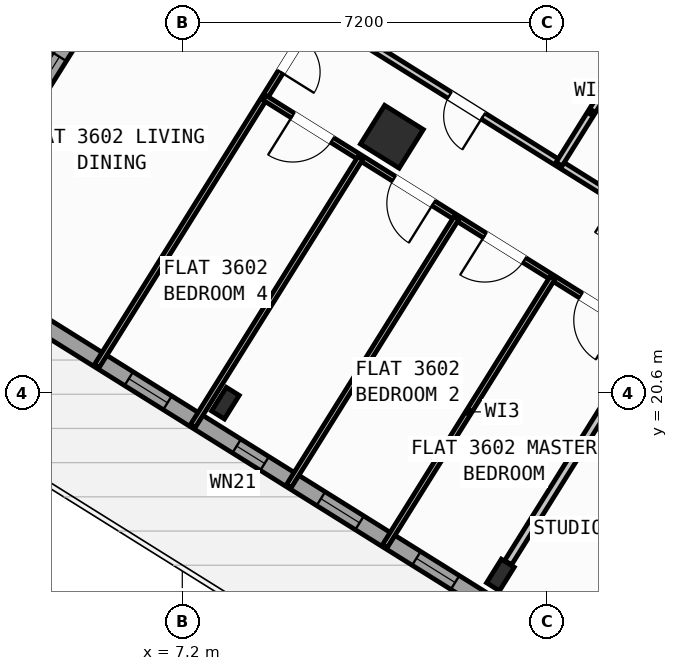
"""IFC4 building model, lengths in metres.
Left out: names, types, materials, properties, quantities, classifications, styles, units other than length and angle.
Written with IfcOpenShell. Run it as: python <this file> out.ifc"""

import sys

from ifc_helpers import new_model, si_unit, direction, frame, frame_2d, origin, origin_2d, place, context, subcontext, project, spatial, rectangle, hollow_rectangle, i_section, extrude, source, transform, mapped, element, fill, save


model = new_model("IFC4")
c1 = context("Model", 3, precision=1e-05, world=origin(), true_north=direction((0.0, 1.0)))
c2 = subcontext(c1, "Body", "Model", "MODEL_VIEW")
j1 = project(units=[si_unit("LENGTHUNIT", "METRE"), si_unit("PLANEANGLEUNIT", "RADIAN")], contexts=[c1])
p1 = place(None, origin())
s1 = spatial("IfcSite", under=j1, at=p1, CompositionType="ELEMENT")
p2 = place(p1, origin())
s2 = spatial("IfcBuilding", under=s1, at=p2, CompositionType="ELEMENT")
p3 = place(p2, frame((0.0, 0.0, 144.3)))
s3 = spatial("IfcBuildingStorey", under=s2, at=p3, CompositionType="ELEMENT", Elevation=144.3)
m1 = source(origin(), c2, "Body", "SweptSolid", [
    extrude(i_section(OverallWidth=0.3, OverallDepth=0.55, WebThickness=0.015, FlangeThickness=0.029, at=origin_2d()), origin(), (0.0, 0.0, 1.0), 3.6),
])
p4 = place(p3, frame((13.478, 17.003, 0.0), z_axis=(0.0, 0.0, 1.0), x_axis=(-0.848048096156, 0.529919264233, 0.0)))
e1 = element("IfcColumn", 1, at=p4, inside=s3, PredefinedType="COLUMN", context=c2, shape_type="MappedRepresentation", body=[
    mapped(m1, transform((0.0, 0.0, 0.0), scale=1.0)),
])
m2 = source(origin(), c2, "Body", "SweptSolid", [
    extrude(hollow_rectangle(XDim=0.9, YDim=0.9, WallThickness=0.036, at=origin_2d()), origin(), (0.0, 0.0, 1.0), 3.6),
])
p5 = place(p3, frame((11.336, 25.653, 0.0), z_axis=(0.0, 0.0, 1.0), x_axis=(-0.848048096156, 0.529919264233, 0.0)))
e2 = element("IfcColumn", 2, at=p5, inside=s3, PredefinedType="COLUMN", context=c2, shape_type="MappedRepresentation", body=[
    mapped(m2, transform((0.0, 0.0, 0.0), scale=1.0)),
])
p6 = place(p3, frame((8.051, 20.395, 0.0), z_axis=(0.0, 0.0, 1.0), x_axis=(-0.848048096156, 0.529919264233, 0.0)))
e3 = element("IfcColumn", 3, at=p6, inside=s3, PredefinedType="COLUMN", context=c2, shape_type="MappedRepresentation", body=[
    mapped(m1, transform((0.0, 0.0, 0.0), scale=1.0)),
])
p7 = place(p3, frame((29.268, 6.429, 0.0), z_axis=(0.0, 0.0, 1.0), x_axis=(-0.848049971435, 0.529916263149, 0.0)))
e4 = element("IfcWall", 4, at=p7, inside=s3, PredefinedType="STANDARD", context=c2, shape_type="SweptSolid", body=[
    extrude(rectangle(XDim=31.588, YDim=0.32, at=frame_2d((15.794, 0.0))), origin(), (0.0, 0.0, 1.0), 3.35),
])
p8 = place(p7, frame((16.362, 0.0, 0.0)))
e5 = element("IfcOpeningElement", 5, at=p8, cuts=e4, PredefinedType="OPENING", context=c2, shape_type="SweptSolid", body=[
    extrude(rectangle(XDim=1.2, YDim=2.15, at=frame_2d((0.6, 1.075))), frame((0.0, 0.17, 0.0), z_axis=(0.0, -1.0, 0.0), x_axis=(1.0, 0.0, 0.0)), (0.0, 0.0, 1.0), 0.34),
])
p9 = place(p7, frame((2.989, 0.0, 0.8)))
e6 = element("IfcOpeningElement", 6, at=p9, cuts=e4, PredefinedType="OPENING", context=c2, shape_type="SweptSolid", body=[
    extrude(rectangle(XDim=2.1, YDim=1.55, at=frame_2d((1.05, 0.775))), frame((0.0, 0.17, 0.0), z_axis=(0.0, -1.0, 0.0), x_axis=(1.0, 0.0, 0.0)), (0.0, 0.0, 1.0), 0.34),
])
p10 = place(p7, frame((8.359, 0.0, 0.8)))
e7 = element("IfcOpeningElement", 7, at=p10, cuts=e4, PredefinedType="OPENING", context=c2, shape_type="SweptSolid", body=[
    extrude(rectangle(XDim=2.1, YDim=1.55, at=frame_2d((1.05, 0.775))), frame((0.0, 0.17, 0.0), z_axis=(0.0, -1.0, 0.0), x_axis=(1.0, 0.0, 0.0)), (0.0, 0.0, 1.0), 0.34),
])
p11 = place(p7, frame((13.284, 0.0, 0.95)))
e8 = element("IfcOpeningElement", 8, at=p11, cuts=e4, PredefinedType="OPENING", context=c2, shape_type="SweptSolid", body=[
    extrude(rectangle(XDim=1.2, YDim=1.4, at=frame_2d((0.6, 0.7))), frame((0.0, 0.17, 0.0), z_axis=(0.0, -1.0, 0.0), x_axis=(1.0, 0.0, 0.0)), (0.0, 0.0, 1.0), 0.34),
])
p12 = place(p7, frame((29.188, 0.0, 0.95)))
e9 = element("IfcOpeningElement", 9, at=p12, cuts=e4, PredefinedType="OPENING", context=c2, shape_type="SweptSolid", body=[
    extrude(rectangle(XDim=1.2, YDim=1.4, at=frame_2d((0.6, 0.7))), frame((0.0, 0.17, 0.0), z_axis=(0.0, -1.0, 0.0), x_axis=(1.0, 0.0, 0.0)), (0.0, 0.0, 1.0), 0.34),
])
p13 = place(p7, frame((19.674, 0.0, 1.0)))
e10 = element("IfcOpeningElement", 10, at=p13, cuts=e4, PredefinedType="OPENING", context=c2, shape_type="SweptSolid", body=[
    extrude(rectangle(XDim=0.9, YDim=1.25, at=frame_2d((0.45, 0.625))), frame((0.0, 0.17, 0.0), z_axis=(0.0, -1.0, 0.0), x_axis=(1.0, 0.0, 0.0)), (0.0, 0.0, 1.0), 0.34),
])
p14 = place(p7, frame((21.896, 0.0, 1.0)))
e11 = element("IfcOpeningElement", 11, at=p14, cuts=e4, PredefinedType="OPENING", context=c2, shape_type="SweptSolid", body=[
    extrude(rectangle(XDim=0.9, YDim=1.25, at=frame_2d((0.45, 0.625))), frame((0.0, 0.17, 0.0), z_axis=(0.0, -1.0, 0.0), x_axis=(1.0, 0.0, 0.0)), (0.0, 0.0, 1.0), 0.34),
])
p15 = place(p7, frame((24.106, 0.0, 1.0)))
e12 = element("IfcOpeningElement", 12, at=p15, cuts=e4, PredefinedType="OPENING", context=c2, shape_type="SweptSolid", body=[
    extrude(rectangle(XDim=0.65, YDim=1.15, at=frame_2d((0.325, 0.575))), frame((0.0, 0.17, 0.0), z_axis=(0.0, -1.0, 0.0), x_axis=(1.0, 0.0, 0.0)), (0.0, 0.0, 1.0), 0.34),
])
p16 = place(p7, frame((26.366, 0.0, 1.0)))
e13 = element("IfcOpeningElement", 13, at=p16, cuts=e4, PredefinedType="OPENING", context=c2, shape_type="SweptSolid", body=[
    extrude(rectangle(XDim=0.9, YDim=1.25, at=frame_2d((0.45, 0.625))), frame((0.0, 0.17, 0.0), z_axis=(0.0, -1.0, 0.0), x_axis=(1.0, 0.0, 0.0)), (0.0, 0.0, 1.0), 0.34),
])
p17 = place(p3, frame((2.415, 23.452, 0.0), z_axis=(0.0, 0.0, 1.0), x_axis=(0.52991049553, 0.848053575387, 0.0)))
e14 = element("IfcWall", 14, at=p17, inside=s3, PredefinedType="STANDARD", context=c2, shape_type="SweptSolid", body=[
    extrude(rectangle(XDim=21.587, YDim=0.32, at=frame_2d((10.794, 0.0))), origin(), (0.0, 0.0, 1.0), 2.775),
])
p18 = place(p17, frame((2.356, 0.0, 0.8)))
e15 = element("IfcOpeningElement", 15, at=p18, cuts=e14, PredefinedType="OPENING", context=c2, shape_type="SweptSolid", body=[
    extrude(rectangle(XDim=2.1, YDim=1.55, at=frame_2d((1.05, 0.775))), frame((0.0, 0.17, 0.0), z_axis=(0.0, -1.0, 0.0), x_axis=(1.0, 0.0, 0.0)), (0.0, 0.0, 1.0), 0.34),
])
p19 = place(p17, frame((8.639, 0.0, 1.0)))
e16 = element("IfcOpeningElement", 16, at=p19, cuts=e14, PredefinedType="OPENING", context=c2, shape_type="SweptSolid", body=[
    extrude(rectangle(XDim=0.9, YDim=1.25, at=frame_2d((0.45, 0.625))), frame((0.0, 0.17, 0.0), z_axis=(0.0, -1.0, 0.0), x_axis=(1.0, 0.0, 0.0)), (0.0, 0.0, 1.0), 0.34),
])
p20 = place(p17, frame((17.744, 0.0, 0.85)))
e17 = element("IfcOpeningElement", 17, at=p20, cuts=e14, PredefinedType="OPENING", context=c2, shape_type="SweptSolid", body=[
    extrude(rectangle(XDim=1.5, YDim=1.5, at=frame_2d((0.75, 0.75))), frame((0.0, 0.17, 0.0), z_axis=(0.0, -1.0, 0.0), x_axis=(1.0, 0.0, 0.0)), (0.0, 0.0, 1.0), 0.34),
])
p21 = place(p3, frame((14.138, 41.825, 0.0), z_axis=(0.0, 0.0, 1.0), x_axis=(0.848046498049, -0.529921821731, 0.0)))
e18 = element("IfcWall", 18, at=p21, inside=s3, PredefinedType="STANDARD", context=c2, shape_type="SweptSolid", body=[
    extrude(rectangle(XDim=31.588, YDim=0.32, at=frame_2d((15.794, 0.0))), origin(), (0.0, 0.0, 1.0), 3.35),
])
p22 = place(p21, frame((2.949, 0.0, 0.0)))
e19 = element("IfcOpeningElement", 19, at=p22, cuts=e18, PredefinedType="OPENING", context=c2, shape_type="SweptSolid", body=[
    extrude(rectangle(XDim=1.05, YDim=2.15, at=frame_2d((0.525, 1.075))), frame((0.0, 0.17, 0.0), z_axis=(0.0, -1.0, 0.0), x_axis=(1.0, 0.0, 0.0)), (0.0, 0.0, 1.0), 0.34),
])
p23 = place(p21, frame((0.861, 0.0, 0.85)))
e20 = element("IfcOpeningElement", 20, at=p23, cuts=e18, PredefinedType="OPENING", context=c2, shape_type="SweptSolid", body=[
    extrude(rectangle(XDim=1.5, YDim=1.5, at=frame_2d((0.75, 0.75))), frame((0.0, 0.17, 0.0), z_axis=(0.0, -1.0, 0.0), x_axis=(1.0, 0.0, 0.0)), (0.0, 0.0, 1.0), 0.34),
])
p24 = place(p21, frame((8.494, 0.0, 0.85)))
e21 = element("IfcOpeningElement", 21, at=p24, cuts=e18, PredefinedType="OPENING", context=c2, shape_type="SweptSolid", body=[
    extrude(rectangle(XDim=1.8, YDim=1.5, at=frame_2d((0.9, 0.75))), frame((0.0, 0.17, 0.0), z_axis=(0.0, -1.0, 0.0), x_axis=(1.0, 0.0, 0.0)), (0.0, 0.0, 1.0), 0.34),
])
p25 = place(p21, frame((13.874, 0.0, 0.85)))
e22 = element("IfcOpeningElement", 22, at=p25, cuts=e18, PredefinedType="OPENING", context=c2, shape_type="SweptSolid", body=[
    extrude(rectangle(XDim=1.5, YDim=1.5, at=frame_2d((0.75, 0.75))), frame((0.0, 0.17, 0.0), z_axis=(0.0, -1.0, 0.0), x_axis=(1.0, 0.0, 0.0)), (0.0, 0.0, 1.0), 0.34),
])
p26 = place(p21, frame((17.104, 0.0, 1.0)))
e23 = element("IfcOpeningElement", 23, at=p26, cuts=e18, PredefinedType="OPENING", context=c2, shape_type="SweptSolid", body=[
    extrude(rectangle(XDim=0.9, YDim=1.25, at=frame_2d((0.45, 0.625))), frame((0.0, 0.17, 0.0), z_axis=(0.0, -1.0, 0.0), x_axis=(1.0, 0.0, 0.0)), (0.0, 0.0, 1.0), 0.34),
])
p27 = place(p21, frame((22.144, 0.0, 1.0)))
e24 = element("IfcOpeningElement", 24, at=p27, cuts=e18, PredefinedType="OPENING", context=c2, shape_type="SweptSolid", body=[
    extrude(rectangle(XDim=0.9, YDim=1.25, at=frame_2d((0.45, 0.625))), frame((0.0, 0.17, 0.0), z_axis=(0.0, -1.0, 0.0), x_axis=(1.0, 0.0, 0.0)), (0.0, 0.0, 1.0), 0.34),
])
p28 = place(p21, frame((27.744, 0.0, 1.0)))
e25 = element("IfcOpeningElement", 25, at=p28, cuts=e18, PredefinedType="OPENING", context=c2, shape_type="SweptSolid", body=[
    extrude(rectangle(XDim=0.9, YDim=1.25, at=frame_2d((0.45, 0.625))), frame((0.0, 0.17, 0.0), z_axis=(0.0, -1.0, 0.0), x_axis=(1.0, 0.0, 0.0)), (0.0, 0.0, 1.0), 0.34),
])
p29 = place(p3, frame((23.104, 25.256, 0.0), z_axis=(0.0, 0.0, 1.0), x_axis=(-0.848041752158, 0.529929416617, 0.0)))
e26 = element("IfcWall", 26, at=p29, inside=s3, PredefinedType="PARTITIONING", context=c2, shape_type="SweptSolid", body=[
    extrude(rectangle(XDim=16.73, YDim=0.16, at=frame_2d((8.365, 0.0))), origin(), (0.0, 0.0, 1.0), 3.34),
])
p30 = place(p29, frame((2.22, 0.0, 0.0)))
e27 = element("IfcOpeningElement", 27, at=p30, cuts=e26, PredefinedType="OPENING", context=c2, shape_type="SweptSolid", body=[
    extrude(rectangle(XDim=0.86, YDim=2.05, at=frame_2d((0.43, 1.025))), frame((0.0, 0.09, 0.0), z_axis=(0.0, -1.0, 0.0), x_axis=(1.0, 0.0, 0.0)), (0.0, 0.0, 1.0), 0.18),
])
p31 = place(p29, frame((12.084, 0.0, 0.0)))
e28 = element("IfcOpeningElement", 28, at=p31, cuts=e26, PredefinedType="OPENING", context=c2, shape_type="SweptSolid", body=[
    extrude(rectangle(XDim=1.0, YDim=2.1, at=frame_2d((0.5, 1.05))), frame((0.0, 0.09, 0.0), z_axis=(0.0, -1.0, 0.0), x_axis=(1.0, 0.0, 0.0)), (0.0, 0.0, 1.0), 0.18),
])
p32 = place(p3, frame((21.938, 23.391, 0.0), z_axis=(0.0, 0.0, 1.0), x_axis=(-0.848045850158, 0.529922858565, 0.0)))
e29 = element("IfcWall", 29, at=p32, inside=s3, PredefinedType="PARTITIONING", context=c2, shape_type="SweptSolid", body=[
    extrude(rectangle(XDim=16.73, YDim=0.16, at=frame_2d((8.365, 0.0))), origin(), (0.0, 0.0, 1.0), 3.34),
])
p33 = place(p32, frame((2.22, 0.0, 0.0)))
e30 = element("IfcOpeningElement", 30, at=p33, cuts=e29, PredefinedType="OPENING", context=c2, shape_type="SweptSolid", body=[
    extrude(rectangle(XDim=0.86, YDim=2.05, at=frame_2d((0.43, 1.025))), frame((0.0, 0.09, 0.0), z_axis=(0.0, -1.0, 0.0), x_axis=(1.0, 0.0, 0.0)), (0.0, 0.0, 1.0), 0.18),
])
p34 = place(p32, frame((14.22, 0.0, 0.0)))
e31 = element("IfcOpeningElement", 31, at=p34, cuts=e29, PredefinedType="OPENING", context=c2, shape_type="SweptSolid", body=[
    extrude(rectangle(XDim=1.0, YDim=2.1, at=frame_2d((0.5, 1.05))), frame((0.0, 0.09, 0.0), z_axis=(0.0, -1.0, 0.0), x_axis=(1.0, 0.0, 0.0)), (0.0, 0.0, 1.0), 0.18),
])
p35 = place(p3, frame((16.519, 21.87, 0.0), z_axis=(0.0, 0.0, 1.0), x_axis=(-0.529922447305, -0.848046107144, 0.0)))
e32 = element("IfcWall", 32, at=p35, inside=s3, PredefinedType="PARTITIONING", context=c2, shape_type="SweptSolid", body=[
    extrude(rectangle(XDim=5.451, YDim=0.16, at=frame_2d((2.726, 0.0))), origin(), (0.0, 0.0, 1.0), 2.775),
])
p36 = place(p3, frame((11.143, 30.136, 0.0), z_axis=(0.0, 0.0, 1.0), x_axis=(-0.529922479612, -0.848046086956, 0.0)))
e33 = element("IfcWall", 33, at=p36, inside=s3, PredefinedType="PARTITIONING", context=c2, shape_type="SweptSolid", body=[
    extrude(rectangle(XDim=10.62, YDim=0.11, at=frame_2d((5.31, 0.0))), origin(), (0.0, 0.0, 1.0), 3.34),
])
p37 = place(p36, frame((3.0, 0.0, 0.0)))
e34 = element("IfcOpeningElement", 34, at=p37, cuts=e33, PredefinedType="OPENING", context=c2, shape_type="SweptSolid", body=[
    extrude(rectangle(XDim=0.78, YDim=2.05, at=frame_2d((0.39, 1.025))), frame((0.0, 0.065, 0.0), z_axis=(0.0, -1.0, 0.0), x_axis=(1.0, 0.0, 0.0)), (0.0, 0.0, 1.0), 0.13),
])
p38 = place(p3, frame((17.452, 23.364, 0.0), z_axis=(0.0, 0.0, 1.0), x_axis=(-0.848044326704, 0.52992529657, 0.0)))
e35 = element("IfcWall", 35, at=p38, inside=s3, PredefinedType="PLUMBINGWALL", context=c2, shape_type="SweptSolid", body=[
    extrude(rectangle(XDim=8.94, YDim=0.14, at=frame_2d((4.47, 0.0))), origin(), (0.0, 0.0, 1.0), 3.34),
])
p39 = place(p38, frame((5.087, 0.0, 0.0)))
e36 = element("IfcOpeningElement", 36, at=p39, cuts=e35, PredefinedType="OPENING", context=c2, shape_type="SweptSolid", body=[
    extrude(rectangle(XDim=0.78, YDim=2.05, at=frame_2d((0.39, 1.025))), frame((0.0, 0.08, 0.0), z_axis=(0.0, -1.0, 0.0), x_axis=(1.0, 0.0, 0.0)), (0.0, 0.0, 1.0), 0.16),
])
p40 = place(p38, frame((1.218, 0.0, 0.0)))
e37 = element("IfcOpeningElement", 37, at=p40, cuts=e35, PredefinedType="OPENING", context=c2, shape_type="SweptSolid", body=[
    extrude(rectangle(XDim=0.78, YDim=2.05, at=frame_2d((0.39, 1.025))), frame((0.0, 0.08, 0.0), z_axis=(0.0, -1.0, 0.0), x_axis=(1.0, 0.0, 0.0)), (0.0, 0.0, 1.0), 0.16),
])
p41 = place(p3, frame((15.913, 27.156, 0.0), z_axis=(0.0, 0.0, 1.0), x_axis=(-0.529935194983, -0.848038141311, 0.0)))
e38 = element("IfcWall", 38, at=p41, inside=s3, PredefinedType="PLUMBINGWALL", context=c2, shape_type="SweptSolid", body=[
    extrude(rectangle(XDim=2.41, YDim=0.14, at=frame_2d((1.205, 0.0))), origin(), (0.0, 0.0, 1.0), 3.34),
])
p42 = place(p3, frame((16.403, 21.685, 0.0), z_axis=(0.0, 0.0, 1.0), x_axis=(-0.848044326704, 0.52992529657, 0.0)))
e39 = element("IfcWall", 39, at=p42, inside=s3, PredefinedType="PARTITIONING", context=c2, shape_type="SweptSolid", body=[
    extrude(rectangle(XDim=8.94, YDim=0.11, at=frame_2d((4.47, 0.0))), origin(), (0.0, 0.0, 1.0), 3.34),
])
p43 = place(p42, frame((0.657, 0.0, 0.0)))
e40 = element("IfcOpeningElement", 40, at=p43, cuts=e39, PredefinedType="OPENING", context=c2, shape_type="SweptSolid", body=[
    extrude(rectangle(XDim=0.92, YDim=2.08, at=frame_2d((0.46, 1.04))), frame((0.0, 0.065, 0.0), z_axis=(0.0, -1.0, 0.0), x_axis=(1.0, 0.0, 0.0)), (0.0, 0.0, 1.0), 0.13),
])
p44 = place(p42, frame((2.893, 0.0, 0.0)))
e41 = element("IfcOpeningElement", 41, at=p44, cuts=e39, PredefinedType="OPENING", context=c2, shape_type="SweptSolid", body=[
    extrude(rectangle(XDim=0.92, YDim=2.08, at=frame_2d((0.46, 1.04))), frame((0.0, 0.065, 0.0), z_axis=(0.0, -1.0, 0.0), x_axis=(1.0, 0.0, 0.0)), (0.0, 0.0, 1.0), 0.13),
])
p45 = place(p42, frame((5.008, 0.0, 0.0)))
e42 = element("IfcOpeningElement", 42, at=p45, cuts=e39, PredefinedType="OPENING", context=c2, shape_type="SweptSolid", body=[
    extrude(rectangle(XDim=0.92, YDim=2.08, at=frame_2d((0.46, 1.04))), frame((0.0, 0.065, 0.0), z_axis=(0.0, -1.0, 0.0), x_axis=(1.0, 0.0, 0.0)), (0.0, 0.0, 1.0), 0.13),
])
p46 = place(p42, frame((7.363, 0.0, 0.0)))
e43 = element("IfcOpeningElement", 43, at=p46, cuts=e39, PredefinedType="OPENING", context=c2, shape_type="SweptSolid", body=[
    extrude(rectangle(XDim=0.92, YDim=2.08, at=frame_2d((0.46, 1.04))), frame((0.0, 0.065, 0.0), z_axis=(0.0, -1.0, 0.0), x_axis=(1.0, 0.0, 0.0)), (0.0, 0.0, 1.0), 0.13),
])
for number, where, z_axis, x_axis in (
    (44, (14.508, 22.869, 0.0), (0.0, 0.0, 1.0), (-0.53, -0.848, 0.0)),
    (45, (12.613, 24.053, 0.0), (0.0, 0.0, 1.0), (-0.53, -0.848, 0.0)),
):
    element("IfcWall", number, at=place(p3, frame(where, z_axis=z_axis, x_axis=x_axis)), inside=s3, PredefinedType="PARTITIONING", context=c2, shape_type="SweptSolid", body=[
        extrude(rectangle(XDim=6.24, YDim=0.11, at=frame_2d((3.12, 0.0))), origin(), (0.0, 0.0, 1.0), 2.995),
    ])
p47 = place(p3, frame((10.717, 25.238, 0.0), z_axis=(0.0, 0.0, 1.0), x_axis=(-0.52991804857, -0.848048855786, 0.0)))
e46 = element("IfcWall", 46, at=p47, inside=s3, PredefinedType="PARTITIONING", context=c2, shape_type="SweptSolid", body=[
    extrude(rectangle(XDim=6.24, YDim=0.11, at=frame_2d((3.12, 0.0))), origin(), (0.0, 0.0, 1.0), 3.34),
])
m3 = source(origin(), c2, "Body", "SweptSolid", [
    extrude(rectangle(XDim=2.1, YDim=1.55, at=frame_2d((1.05, 0.775))), frame((0.0, 0.03, 0.0), z_axis=(0.0, -1.0, 0.0), x_axis=(1.0, 0.0, 0.0)), (0.0, 0.0, 1.0), 0.06),
])
p48 = place(p18, origin())
e47 = element("IfcWindow", 47, at=p48, inside=s3, PartitioningType="SINGLE_PANEL", PredefinedType="WINDOW", context=c2, shape_type="MappedRepresentation", body=[
    mapped(m3, transform((0.0, 0.0, 0.0), scale=1.0)),
])
fill(e15, e47)
m4 = source(origin(), c2, "Body", "SweptSolid", [
    extrude(rectangle(XDim=0.9, YDim=1.25, at=frame_2d((0.45, 0.625))), frame((0.0, 0.03, 0.0), z_axis=(0.0, -1.0, 0.0), x_axis=(1.0, 0.0, 0.0)), (0.0, 0.0, 1.0), 0.06),
])
p49 = place(p13, origin())
e48 = element("IfcWindow", 48, at=p49, inside=s3, PartitioningType="SINGLE_PANEL", PredefinedType="WINDOW", context=c2, shape_type="MappedRepresentation", body=[
    mapped(m4, transform((0.0, 0.0, 0.0), scale=1.0)),
])
fill(e10, e48)
p50 = place(p14, origin())
e49 = element("IfcWindow", 49, at=p50, inside=s3, PartitioningType="SINGLE_PANEL", PredefinedType="WINDOW", context=c2, shape_type="MappedRepresentation", body=[
    mapped(m4, transform((0.0, 0.0, 0.0), scale=1.0)),
])
fill(e11, e49)
m5 = source(origin(), c2, "Body", "SweptSolid", [
    extrude(rectangle(XDim=0.65, YDim=1.15, at=frame_2d((0.325, 0.575))), frame((0.0, 0.03, 0.0), z_axis=(0.0, -1.0, 0.0), x_axis=(1.0, 0.0, 0.0)), (0.0, 0.0, 1.0), 0.06),
])
p51 = place(p15, origin())
e50 = element("IfcWindow", 50, at=p51, inside=s3, PartitioningType="SINGLE_PANEL", PredefinedType="WINDOW", context=c2, shape_type="MappedRepresentation", body=[
    mapped(m5, transform((0.0, 0.0, 0.0), scale=1.0)),
])
fill(e12, e50)
p52 = place(p16, origin())
e51 = element("IfcWindow", 51, at=p52, inside=s3, PartitioningType="SINGLE_PANEL", PredefinedType="WINDOW", context=c2, shape_type="MappedRepresentation", body=[
    mapped(m4, transform((0.0, 0.0, 0.0), scale=1.0)),
])
fill(e13, e51)
m6 = source(origin(), c2, "Body", "SweptSolid", [
    extrude(rectangle(XDim=0.78, YDim=2.05, at=frame_2d((0.39, 1.025))), frame((0.0, 0.025, 0.0), z_axis=(0.0, -1.0, 0.0), x_axis=(1.0, 0.0, 0.0)), (0.0, 0.0, 1.0), 0.05),
])
p53 = place(p37, origin())
e52 = element("IfcDoor", 52, at=p53, inside=s3, OperationType="SINGLE_SWING_RIGHT", PredefinedType="DOOR", context=c2, shape_type="MappedRepresentation", body=[
    mapped(m6, transform((0.0, 0.0, 0.0), scale=1.0)),
])
fill(e34, e52)
p54 = place(p39, origin())
e53 = element("IfcDoor", 53, at=p54, inside=s3, OperationType="SINGLE_SWING_LEFT", PredefinedType="DOOR", context=c2, shape_type="MappedRepresentation", body=[
    mapped(m6, transform((0.0, 0.0, 0.0), scale=1.0)),
])
fill(e36, e53)
m7 = source(origin(), c2, "Body", "SweptSolid", [
    extrude(rectangle(XDim=0.92, YDim=2.08, at=frame_2d((0.46, 1.04))), frame((0.0, 0.025, 0.0), z_axis=(0.0, -1.0, 0.0), x_axis=(1.0, 0.0, 0.0)), (0.0, 0.0, 1.0), 0.05),
])
p55 = place(p43, origin())
e54 = element("IfcDoor", 54, at=p55, inside=s3, OperationType="SINGLE_SWING_LEFT", PredefinedType="DOOR", context=c2, shape_type="MappedRepresentation", body=[
    mapped(m7, transform((0.0, 0.0, 0.0), scale=1.0)),
])
fill(e40, e54)
p56 = place(p44, origin())
e55 = element("IfcDoor", 55, at=p56, inside=s3, OperationType="SINGLE_SWING_RIGHT", PredefinedType="DOOR", context=c2, shape_type="MappedRepresentation", body=[
    mapped(m7, transform((0.0, 0.0, 0.0), scale=1.0)),
])
fill(e41, e55)
p57 = place(p45, origin())
e56 = element("IfcDoor", 56, at=p57, inside=s3, OperationType="SINGLE_SWING_LEFT", PredefinedType="DOOR", context=c2, shape_type="MappedRepresentation", body=[
    mapped(m7, transform((0.0, 0.0, 0.0), scale=1.0)),
])
fill(e42, e56)
p58 = place(p46, origin())
e57 = element("IfcDoor", 57, at=p58, inside=s3, OperationType="SINGLE_SWING_RIGHT", PredefinedType="DOOR", context=c2, shape_type="MappedRepresentation", body=[
    mapped(m7, transform((0.0, 0.0, 0.0), scale=1.0)),
])
fill(e43, e57)
save(model, sys.argv[1])
